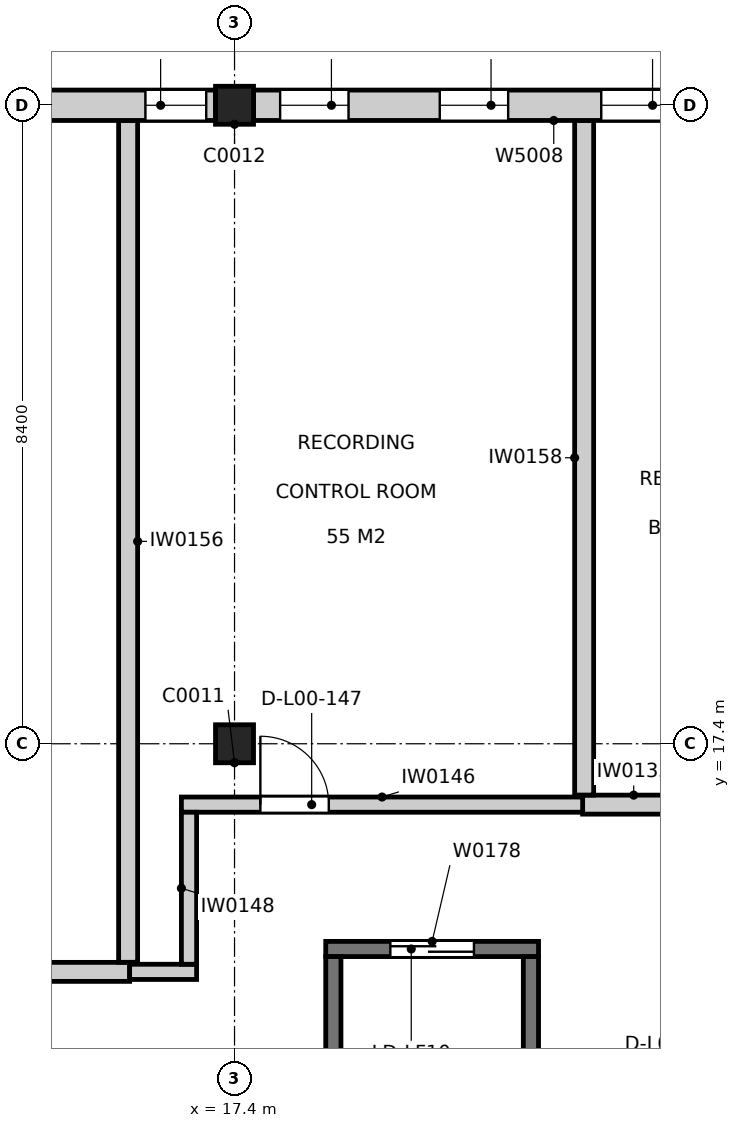
"""IFC4 building model, lengths in metres.
Left out: names, types, materials, properties, quantities, classifications, styles, units other than length and angle.
Written with IfcOpenShell. Run it as: python <this file> out.ifc"""

import sys

from ifc_helpers import new_model, si_unit, direction, frame, frame_2d, origin, origin_2d, place, context, subcontext, project, spatial, rectangle, extrude, element, fill, save


model = new_model("IFC4")
c1 = context("Model", 3, precision=1e-05, world=origin(), true_north=direction((0.0, 1.0)))
c2 = subcontext(c1, "Body", "Model", "MODEL_VIEW")
j1 = project(units=[si_unit("LENGTHUNIT", "METRE"), si_unit("PLANEANGLEUNIT", "RADIAN")], contexts=[c1])
p1 = place(None, origin())
s1 = spatial("IfcSite", under=j1, at=p1, CompositionType="ELEMENT")
p2 = place(p1, origin())
s2 = spatial("IfcBuilding", under=s1, at=p2, CompositionType="ELEMENT")
p3 = place(p2, origin())
s3 = spatial("IfcBuildingStorey", under=s2, at=p3, CompositionType="ELEMENT", Elevation=0.0)
for number, where, z_axis, x_axis in (
    (1, (17.4, 17.4, 0.0), (0.0, 0.0, 1.0), (1.0, 0.0, 0.0)),
    (2, (17.4, 25.8, 0.0), (0.0, 0.0, 1.0), (1.0, 0.0, 0.0)),
):
    element("IfcColumn", number, at=place(p3, frame(where, z_axis=z_axis, x_axis=x_axis)), inside=s3, PredefinedType="COLUMN", context=c2, shape_type="SweptSolid", body=[
        extrude(rectangle(XDim=0.5, YDim=0.5, at=origin_2d()), origin(), (0.0, 0.0, 1.0), 4.8),
    ])
p4 = place(p3, frame((18.6, 14.7, 0.0), z_axis=(0.0, 0.0, 1.0), x_axis=(1.0, 0.0, 0.0)))
e3 = element("IfcWall", 3, at=p4, inside=s3, PredefinedType="SOLIDWALL", context=c2, shape_type="SweptSolid", body=[
    extrude(rectangle(XDim=2.8, YDim=0.2, at=frame_2d((1.4, 0.0))), origin(), (0.0, 0.0, 1.0), 4.8),
])
p5 = place(p4, frame((0.85, 0.0, 0.0)))
e4 = element("IfcOpeningElement", 4, at=p5, cuts=e3, PredefinedType="OPENING", context=c2, shape_type="SweptSolid", body=[
    extrude(rectangle(XDim=1.1, YDim=2.1, at=frame_2d((0.55, 1.05))), frame((0.0, 0.11, 0.0), z_axis=(0.0, -1.0, 0.0), x_axis=(1.0, 0.0, 0.0)), (0.0, 0.0, 1.0), 0.22),
])
for number, where, z_axis, x_axis in (
    (5, (18.7, 11.4, 0.0), (0.0, 0.0, 1.0), (0.0, 1.0, 0.0)),
    (6, (21.3, 11.4, 0.0), (0.0, 0.0, 1.0), (0.0, 1.0, 0.0)),
):
    element("IfcWall", number, at=place(p3, frame(where, z_axis=z_axis, x_axis=x_axis)), inside=s3, PredefinedType="SOLIDWALL", context=c2, shape_type="SweptSolid", body=[
        extrude(rectangle(XDim=3.2, YDim=0.2, at=frame_2d((1.6, 0.0))), origin(), (0.0, 0.0, 1.0), 4.8),
    ])
p6 = place(p3, frame((9.775, 14.399, 0.0), z_axis=(0.0, 0.0, 1.0), x_axis=(1.0, 0.0, 0.0)))
e7 = element("IfcWall", 7, at=p6, inside=s3, PredefinedType="PARTITIONING", context=c2, shape_type="SweptSolid", body=[
    extrude(rectangle(XDim=6.245, YDim=0.25, at=frame_2d((3.123, 0.0))), origin(), (0.0, 0.0, 1.0), 4.04),
])
p7 = place(p3, frame((21.98, 16.599, 0.0), z_axis=(0.0, 0.0, 1.0), x_axis=(1.0, 0.0, 0.0)))
e8 = element("IfcWall", 8, at=p7, inside=s3, PredefinedType="PARTITIONING", context=c2, shape_type="SweptSolid", body=[
    extrude(rectangle(XDim=1.344, YDim=0.25, at=frame_2d((0.672, 0.0))), origin(), (0.0, 0.0, 1.0), 4.64),
])
p8 = place(p3, frame((16.701, 16.599, 0.0), z_axis=(0.0, 0.0, 1.0), x_axis=(1.0, 0.0, 0.0)))
e9 = element("IfcWall", 9, at=p8, inside=s3, PredefinedType="PARTITIONING", context=c2, shape_type="SweptSolid", body=[
    extrude(rectangle(XDim=5.279, YDim=0.2, at=frame_2d((2.64, 0.0))), origin(), (0.0, 0.0, 1.0), 3.84),
])
p9 = place(p8, frame((1.039, 0.0, 0.0)))
e10 = element("IfcOpeningElement", 10, at=p9, cuts=e9, PredefinedType="OPENING", context=c2, shape_type="SweptSolid", body=[
    extrude(rectangle(XDim=0.9, YDim=2.1, at=frame_2d((0.45, 1.05))), frame((0.0, 0.11, 0.0), z_axis=(0.0, -1.0, 0.0), x_axis=(1.0, 0.0, 0.0)), (0.0, 0.0, 1.0), 0.22),
])
p10 = place(p3, frame((16.02, 14.399, 0.0), z_axis=(0.0, 0.0, 1.0), x_axis=(1.0, 0.0, 0.0)))
e11 = element("IfcWall", 11, at=p10, inside=s3, PredefinedType="PARTITIONING", context=c2, shape_type="SweptSolid", body=[
    extrude(rectangle(XDim=0.881, YDim=0.2, at=frame_2d((0.44, 0.0))), origin(), (0.0, 0.0, 1.0), 4.04),
])
p11 = place(p3, frame((16.801, 14.499, 0.0), z_axis=(0.0, 0.0, 1.0), x_axis=(0.0, 1.0, 0.0)))
e12 = element("IfcWall", 12, at=p11, inside=s3, PredefinedType="PARTITIONING", context=c2, shape_type="SweptSolid", body=[
    extrude(rectangle(XDim=2.0, YDim=0.2, at=frame_2d((1.0, 0.0))), origin(), (0.0, 0.0, 1.0), 4.04),
])
p12 = place(p3, frame((16.0, 25.6, 0.0), z_axis=(0.0, 0.0, 1.0), x_axis=(0.0, -1.0, 0.0)))
e13 = element("IfcWall", 13, at=p12, inside=s3, PredefinedType="PARTITIONING", context=c2, shape_type="SweptSolid", body=[
    extrude(rectangle(XDim=11.075, YDim=0.25, at=frame_2d((5.538, 0.0))), origin(), (0.0, 0.0, 1.0), 3.84),
])
p13 = place(p3, frame((22.0, 16.725, 0.0), z_axis=(0.0, 0.0, 1.0), x_axis=(0.0, 1.0, 0.0)))
e14 = element("IfcWall", 14, at=p13, inside=s3, PredefinedType="PARTITIONING", context=c2, shape_type="SweptSolid", body=[
    extrude(rectangle(XDim=8.875, YDim=0.25, at=frame_2d((4.438, 0.0))), origin(), (0.0, 0.0, 1.0), 3.84),
])
p14 = place(p3, frame((25.55, 25.8, 0.0), z_axis=(0.0, 0.0, 1.0), x_axis=(-1.0, 0.0, 0.0)))
e15 = element("IfcWall", 15, at=p14, inside=s3, PredefinedType="SOLIDWALL", context=c2, shape_type="SweptSolid", body=[
    extrude(rectangle(XDim=7.9, YDim=0.4, at=frame_2d((3.95, 0.0))), origin(), (0.0, 0.0, 1.0), 3.84),
])
p15 = place(p14, frame((6.65, 0.0, 1.5)))
e16 = element("IfcOpeningElement", 16, at=p15, cuts=e15, PredefinedType="OPENING", context=c2, shape_type="SweptSolid", body=[
    extrude(rectangle(XDim=0.9, YDim=1.2, at=frame_2d((0.45, 0.6))), frame((0.0, 0.21, 0.0), z_axis=(0.0, -1.0, 0.0), x_axis=(1.0, 0.0, 0.0)), (0.0, 0.0, 1.0), 0.42),
])
p16 = place(p14, frame((4.55, 0.0, 1.5)))
e17 = element("IfcOpeningElement", 17, at=p16, cuts=e15, PredefinedType="OPENING", context=c2, shape_type="SweptSolid", body=[
    extrude(rectangle(XDim=0.9, YDim=1.2, at=frame_2d((0.45, 0.6))), frame((0.0, 0.21, 0.0), z_axis=(0.0, -1.0, 0.0), x_axis=(1.0, 0.0, 0.0)), (0.0, 0.0, 1.0), 0.42),
])
p17 = place(p14, frame((2.425, 0.0, 1.5)))
e18 = element("IfcOpeningElement", 18, at=p17, cuts=e15, PredefinedType="OPENING", context=c2, shape_type="SweptSolid", body=[
    extrude(rectangle(XDim=0.9, YDim=1.2, at=frame_2d((0.45, 0.6))), frame((0.0, 0.21, 0.0), z_axis=(0.0, -1.0, 0.0), x_axis=(1.0, 0.0, 0.0)), (0.0, 0.0, 1.0), 0.42),
])
p18 = place(p14, frame((0.475, 0.0, 1.5)))
e19 = element("IfcOpeningElement", 19, at=p18, cuts=e15, PredefinedType="OPENING", context=c2, shape_type="SweptSolid", body=[
    extrude(rectangle(XDim=0.9, YDim=1.2, at=frame_2d((0.45, 0.6))), frame((0.0, 0.21, 0.0), z_axis=(0.0, -1.0, 0.0), x_axis=(1.0, 0.0, 0.0)), (0.0, 0.0, 1.0), 0.42),
])
p19 = place(p3, frame((17.15, 25.8, 0.0), z_axis=(0.0, 0.0, 1.0), x_axis=(-1.0, 0.0, 0.0)))
e20 = element("IfcWall", 20, at=p19, inside=s3, PredefinedType="SOLIDWALL", context=c2, shape_type="SweptSolid", body=[
    extrude(rectangle(XDim=7.9, YDim=0.4, at=frame_2d((3.95, 0.0))), origin(), (0.0, 0.0, 1.0), 3.84),
])
p20 = place(p19, frame((6.65, 0.0, 1.5)))
e21 = element("IfcOpeningElement", 21, at=p20, cuts=e20, PredefinedType="OPENING", context=c2, shape_type="SweptSolid", body=[
    extrude(rectangle(XDim=0.9, YDim=1.2, at=frame_2d((0.45, 0.6))), frame((0.0, 0.21, 0.0), z_axis=(0.0, -1.0, 0.0), x_axis=(1.0, 0.0, 0.0)), (0.0, 0.0, 1.0), 0.42),
])
p21 = place(p19, frame((4.55, 0.0, 1.5)))
e22 = element("IfcOpeningElement", 22, at=p21, cuts=e20, PredefinedType="OPENING", context=c2, shape_type="SweptSolid", body=[
    extrude(rectangle(XDim=0.9, YDim=1.2, at=frame_2d((0.45, 0.6))), frame((0.0, 0.21, 0.0), z_axis=(0.0, -1.0, 0.0), x_axis=(1.0, 0.0, 0.0)), (0.0, 0.0, 1.0), 0.42),
])
p22 = place(p19, frame((2.45, 0.0, 1.5)))
e23 = element("IfcOpeningElement", 23, at=p22, cuts=e20, PredefinedType="OPENING", context=c2, shape_type="SweptSolid", body=[
    extrude(rectangle(XDim=0.9, YDim=1.2, at=frame_2d((0.45, 0.6))), frame((0.0, 0.21, 0.0), z_axis=(0.0, -1.0, 0.0), x_axis=(1.0, 0.0, 0.0)), (0.0, 0.0, 1.0), 0.42),
])
p23 = place(p19, frame((0.122, 0.0, 1.5)))
e24 = element("IfcOpeningElement", 24, at=p23, cuts=e20, PredefinedType="OPENING", context=c2, shape_type="SweptSolid", body=[
    extrude(rectangle(XDim=0.8, YDim=1.2, at=frame_2d((0.4, 0.6))), frame((0.0, 0.21, 0.0), z_axis=(0.0, -1.0, 0.0), x_axis=(1.0, 0.0, 0.0)), (0.0, 0.0, 1.0), 0.42),
])
p24 = place(p9, origin())
e25 = element("IfcDoor", 25, at=p24, inside=s3, OperationType="SINGLE_SWING_LEFT", PredefinedType="DOOR", context=c2, shape_type="SweptSolid", body=[
    extrude(rectangle(XDim=0.9, YDim=2.1, at=frame_2d((0.45, 1.05))), frame((0.0, 0.025, 0.0), z_axis=(0.0, -1.0, 0.0), x_axis=(1.0, 0.0, 0.0)), (0.0, 0.0, 1.0), 0.05),
])
fill(e10, e25)
p25 = place(p15, origin())
e26 = element("IfcWindow", 26, at=p25, inside=s3, PartitioningType="SINGLE_PANEL", PredefinedType="WINDOW", context=c2, shape_type="SweptSolid", body=[
    extrude(rectangle(XDim=0.9, YDim=1.2, at=frame_2d((0.45, 0.6))), frame((0.0, 0.15, 0.0), z_axis=(0.0, -1.0, 0.0), x_axis=(1.0, 0.0, 0.0)), (0.0, 0.0, 1.0), 0.06),
])
fill(e16, e26)
p26 = place(p16, origin())
e27 = element("IfcWindow", 27, at=p26, inside=s3, PartitioningType="SINGLE_PANEL", PredefinedType="WINDOW", context=c2, shape_type="SweptSolid", body=[
    extrude(rectangle(XDim=0.9, YDim=1.2, at=frame_2d((0.45, 0.6))), frame((0.0, 0.15, 0.0), z_axis=(0.0, -1.0, 0.0), x_axis=(1.0, 0.0, 0.0)), (0.0, 0.0, 1.0), 0.06),
])
fill(e17, e27)
p27 = place(p17, origin())
e28 = element("IfcWindow", 28, at=p27, inside=s3, PartitioningType="SINGLE_PANEL", PredefinedType="WINDOW", context=c2, shape_type="SweptSolid", body=[
    extrude(rectangle(XDim=0.9, YDim=1.2, at=frame_2d((0.45, 0.6))), frame((0.0, 0.15, 0.0), z_axis=(0.0, -1.0, 0.0), x_axis=(1.0, 0.0, 0.0)), (0.0, 0.0, 1.0), 0.06),
])
fill(e18, e28)
p28 = place(p23, origin())
e29 = element("IfcWindow", 29, at=p28, inside=s3, PartitioningType="SINGLE_PANEL", PredefinedType="WINDOW", context=c2, shape_type="SweptSolid", body=[
    extrude(rectangle(XDim=0.8, YDim=1.2, at=frame_2d((0.4, 0.6))), frame((0.0, 0.15, 0.0), z_axis=(0.0, -1.0, 0.0), x_axis=(1.0, 0.0, 0.0)), (0.0, 0.0, 1.0), 0.06),
])
fill(e24, e29)
p29 = place(p5, origin())
e30 = element("IfcDoor", 30, at=p29, inside=s3, OperationType="SLIDING_TO_LEFT", PredefinedType="DOOR", context=c2, shape_type="SweptSolid", body=[
    extrude(rectangle(XDim=1.1, YDim=2.1, at=frame_2d((0.55, 1.05))), frame((0.0, 0.025, 0.0), z_axis=(0.0, -1.0, 0.0), x_axis=(1.0, 0.0, 0.0)), (0.0, 0.0, 1.0), 0.05),
])
fill(e4, e30)
save(model, sys.argv[1])
